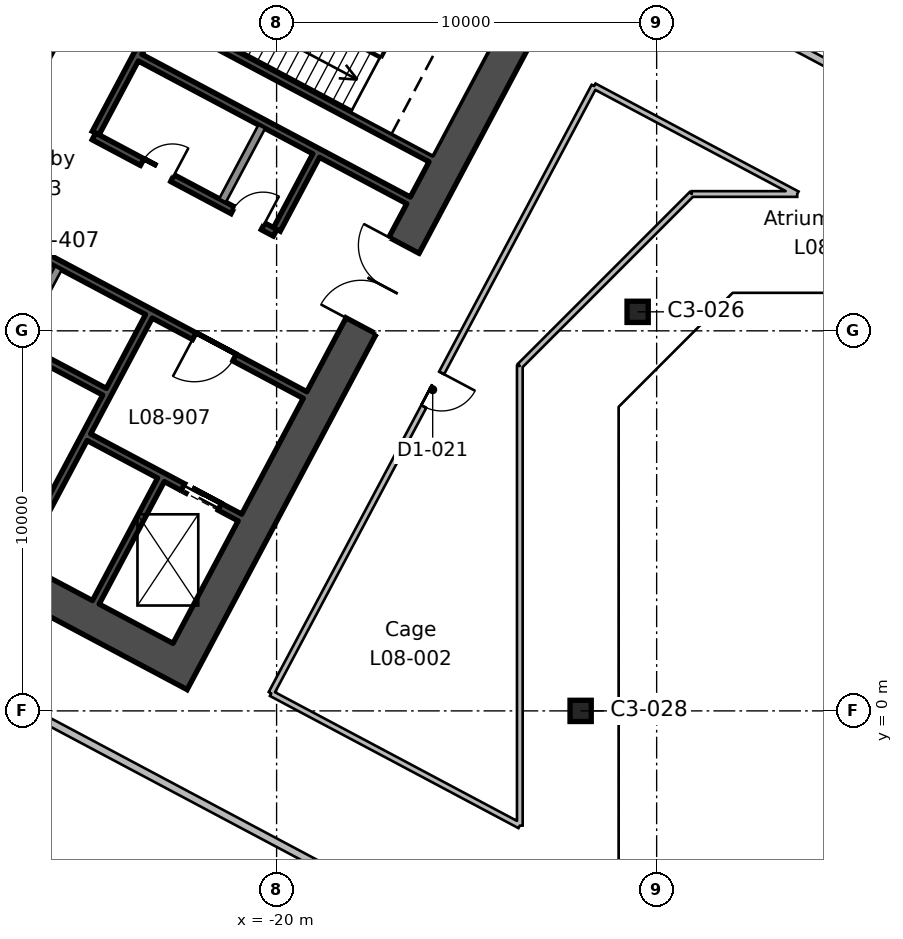
"""IFC4 building model, lengths in metres.
Left out: names, types, materials, properties, quantities, classifications, styles, units other than length and angle.
Written with IfcOpenShell. Run it as: python <this file> out.ifc"""

import sys

from ifc_helpers import new_model, si_unit, direction, frame, frame_2d, origin, origin_2d, place, context, subcontext, project, spatial, rectangle, hollow_rectangle, extrude, element, fill, save


model = new_model("IFC4")
c1 = context("Model", 3, precision=1e-05, world=origin(), true_north=direction((0.0, 1.0)))
c2 = subcontext(c1, "Body", "Model", "MODEL_VIEW")
j1 = project(units=[si_unit("LENGTHUNIT", "METRE"), si_unit("PLANEANGLEUNIT", "RADIAN")], contexts=[c1])
p1 = place(None, origin())
s1 = spatial("IfcSite", under=j1, at=p1, CompositionType="ELEMENT")
p2 = place(p1, origin())
s2 = spatial("IfcBuilding", under=s1, at=p2, CompositionType="ELEMENT")
p3 = place(p2, frame((0.0, 0.0, 44.6)))
s3 = spatial("IfcBuildingStorey", under=s2, at=p3, CompositionType="ELEMENT", Elevation=44.6)
for number, where, z_axis, x_axis in (
    (1, (-12.0, 0.0, 0.0), (0.0, 0.0, 1.0), (1.0, 0.0, 0.0)),
    (2, (-10.5, 10.5, 0.0), (0.0, 0.0, 1.0), (1.0, 0.0, 0.0)),
):
    element("IfcColumn", number, at=place(p3, frame(where, z_axis=z_axis, x_axis=x_axis)), inside=s3, PredefinedType="COLUMN", context=c2, shape_type="SweptSolid", body=[
        extrude(hollow_rectangle(XDim=0.559, YDim=0.559, WallThickness=0.024, InnerFilletRadius=0.012, OuterFilletRadius=0.035, at=origin_2d()), origin(), (0.0, 0.0, 1.0), 5.4),
    ])
p4 = place(p3, frame((-13.362, 18.43, 0.0), z_axis=(0.0, 0.0, 1.0), x_axis=(-0.46947084998, -0.882947971864, 0.0)))
e3 = element("IfcWall", 3, at=p4, inside=s3, PredefinedType="SHEAR", context=c2, shape_type="SweptSolid", body=[
    extrude(rectangle(XDim=20.0, YDim=0.9, at=frame_2d((10.0, 0.0))), origin(), (0.0, 0.0, 1.0), 5.4),
])
p5 = place(p4, frame((7.0, 0.0, 0.0)))
e4 = element("IfcOpeningElement", 4, at=p5, cuts=e3, PredefinedType="OPENING", context=c2, shape_type="SweptSolid", body=[
    extrude(rectangle(XDim=2.4, YDim=2.4, at=frame_2d((1.2, 1.2))), frame((0.0, 0.46, 0.0), z_axis=(0.0, -1.0, 0.0), x_axis=(1.0, 0.0, 0.0)), (0.0, 0.0, 1.0), 0.92),
])
p6 = place(p3, frame((-22.937, 1.38, 0.0), z_axis=(0.0, 0.0, 1.0), x_axis=(-0.88295276571, 0.46946183394, 0.0)))
e5 = element("IfcWall", 5, at=p6, inside=s3, PredefinedType="SHEAR", context=c2, shape_type="SweptSolid", body=[
    extrude(rectangle(XDim=20.2, YDim=0.9, at=frame_2d((10.1, 0.0))), origin(), (0.0, 0.0, 1.0), 5.4),
])
p7 = place(p3, frame((-23.043, 6.08, 0.0), z_axis=(0.0, 0.0, 1.0), x_axis=(-0.469494272526, -0.882935517501, 0.0)))
e6 = element("IfcWall", 6, at=p7, inside=s3, PredefinedType="SHEAR", context=c2, shape_type="SweptSolid", body=[
    extrude(rectangle(XDim=3.65, YDim=0.2, at=frame_2d((1.825, 0.0))), origin(), (0.0, 0.0, 1.0), 5.4),
])
p8 = place(p3, frame((-18.96, 14.611, 0.0), z_axis=(0.0, 0.0, 1.0), x_axis=(-0.4694473164, -0.882960484464, 0.0)))
e7 = element("IfcWall", 7, at=p8, inside=s3, PredefinedType="SHEAR", context=c2, shape_type="SweptSolid", body=[
    extrude(rectangle(XDim=2.2, YDim=0.2, at=frame_2d((1.1, 0.0))), origin(), (0.0, 0.0, 1.0), 5.4),
])
p9 = place(p3, frame((-20.39, 15.372, 0.0), z_axis=(0.0, 0.0, 1.0), x_axis=(-0.4694473164, -0.882960484464, 0.0)))
e8 = element("IfcWall", 8, at=p9, inside=s3, PredefinedType="SOLIDWALL", context=c2, shape_type="SweptSolid", body=[
    extrude(rectangle(XDim=2.2, YDim=0.2, at=frame_2d((1.1, 0.0))), origin(), (0.0, 0.0, 1.0), 5.4),
])
p10 = place(p3, frame((-23.36, 10.382, 0.0), z_axis=(0.0, 0.0, 1.0), x_axis=(-0.469480409012, -0.88294288918, 0.0)))
e9 = element("IfcWall", 9, at=p10, inside=s3, PredefinedType="SHEAR", context=c2, shape_type="SweptSolid", body=[
    extrude(rectangle(XDim=7.3, YDim=0.2, at=frame_2d((3.65, 0.0))), origin(), (0.0, 0.0, 1.0), 5.4),
])
p11 = place(p3, frame((-25.744, 11.65, 0.0), z_axis=(0.0, 0.0, 1.0), x_axis=(-0.469487830541, -0.882938942948, 0.0)))
e10 = element("IfcWall", 10, at=p11, inside=s3, PredefinedType="SOLIDWALL", context=c2, shape_type="SweptSolid", body=[
    extrude(rectangle(XDim=2.2, YDim=0.2, at=frame_2d((1.1, 0.0))), origin(), (0.0, 0.0, 1.0), 5.4),
])
p12 = place(p3, frame((-21.333, 21.649, 0.0), z_axis=(0.0, 0.0, 1.0), x_axis=(-0.469494272526, -0.882935517501, 0.0)))
e11 = element("IfcWall", 11, at=p12, inside=s3, PredefinedType="SHEAR", context=c2, shape_type="SweptSolid", body=[
    extrude(rectangle(XDim=7.3, YDim=0.2, at=frame_2d((3.65, 0.0))), origin(), (0.0, 0.0, 1.0), 5.4),
])
p13 = place(p12, frame((1.3, 0.0, 0.0)))
e12 = element("IfcOpeningElement", 12, at=p13, cuts=e11, PredefinedType="OPENING", context=c2, shape_type="SweptSolid", body=[
    extrude(rectangle(XDim=1.2, YDim=2.1, at=frame_2d((0.6, 1.05))), frame((0.0, 0.11, 0.0), z_axis=(0.0, -1.0, 0.0), x_axis=(1.0, 0.0, 0.0)), (0.0, 0.0, 1.0), 0.22),
])
p14 = place(p3, frame((-23.188, 22.635, 0.0), z_axis=(0.0, 0.0, 1.0), x_axis=(-0.469454336211, -0.882956752176, 0.0)))
e13 = element("IfcWall", 13, at=p14, inside=s3, PredefinedType="SHEAR", context=c2, shape_type="SweptSolid", body=[
    extrude(rectangle(XDim=7.3, YDim=0.2, at=frame_2d((3.65, 0.0))), origin(), (0.0, 0.0, 1.0), 5.4),
])
p15 = place(p14, frame((0.55, 0.0, 0.0)))
e14 = element("IfcOpeningElement", 14, at=p15, cuts=e13, PredefinedType="OPENING", context=c2, shape_type="SweptSolid", body=[
    extrude(rectangle(XDim=0.9, YDim=2.1, at=frame_2d((0.45, 1.05))), frame((0.0, 0.11, 0.0), z_axis=(0.0, -1.0, 0.0), x_axis=(1.0, 0.0, 0.0)), (0.0, 0.0, 1.0), 0.22),
])
p16 = place(p14, frame((2.3, 0.0, 0.0)))
e15 = element("IfcOpeningElement", 15, at=p16, cuts=e13, PredefinedType="OPENING", context=c2, shape_type="SweptSolid", body=[
    extrude(rectangle(XDim=0.9, YDim=2.1, at=frame_2d((0.45, 1.05))), frame((0.0, 0.11, 0.0), z_axis=(0.0, -1.0, 0.0), x_axis=(1.0, 0.0, 0.0)), (0.0, 0.0, 1.0), 0.22),
])
p17 = place(p14, frame((3.8, 0.0, 0.0)))
e16 = element("IfcOpeningElement", 16, at=p17, cuts=e13, PredefinedType="OPENING", context=c2, shape_type="SweptSolid", body=[
    extrude(rectangle(XDim=0.9, YDim=2.1, at=frame_2d((0.45, 1.05))), frame((0.0, 0.11, 0.0), z_axis=(0.0, -1.0, 0.0), x_axis=(1.0, 0.0, 0.0)), (0.0, 0.0, 1.0), 0.22),
])
p18 = place(p3, frame((-15.942, 14.536, 0.0), z_axis=(0.0, 0.0, 1.0), x_axis=(-0.882946947542, 0.469472776449, 0.0)))
e17 = element("IfcWall", 17, at=p18, inside=s3, PredefinedType="SHEAR", context=c2, shape_type="SweptSolid", body=[
    extrude(rectangle(XDim=8.0, YDim=0.2, at=frame_2d((4.0, 0.0))), origin(), (0.0, 0.0, 1.0), 5.4),
])
p19 = place(p3, frame((-16.529, 13.432, 0.0), z_axis=(0.0, 0.0, 1.0), x_axis=(-0.88295287151, 0.469461634952, 0.0)))
e18 = element("IfcWall", 18, at=p19, inside=s3, PredefinedType="SHEAR", context=c2, shape_type="SweptSolid", body=[
    extrude(rectangle(XDim=8.0, YDim=0.2, at=frame_2d((4.0, 0.0))), origin(), (0.0, 0.0, 1.0), 5.4),
])
p20 = place(p3, frame((-20.04, 12.581, 0.0), z_axis=(0.0, 0.0, 1.0), x_axis=(-0.882942972946, 0.469480251476, 0.0)))
e19 = element("IfcWall", 19, at=p20, inside=s3, PredefinedType="SHEAR", context=c2, shape_type="SweptSolid", body=[
    extrude(rectangle(XDim=5.4, YDim=0.2, at=frame_2d((2.7, 0.0))), origin(), (0.0, 0.0, 1.0), 5.4),
])
p21 = place(p20, frame((0.36, 0.0, 0.0)))
e20 = element("IfcOpeningElement", 20, at=p21, cuts=e19, PredefinedType="OPENING", context=c2, shape_type="SweptSolid", body=[
    extrude(rectangle(XDim=0.9, YDim=2.1, at=frame_2d((0.45, 1.05))), frame((0.0, 0.11, 0.0), z_axis=(0.0, -1.0, 0.0), x_axis=(1.0, 0.0, 0.0)), (0.0, 0.0, 1.0), 0.22),
])
p22 = place(p20, frame((3.06, 0.0, 0.0)))
e21 = element("IfcOpeningElement", 21, at=p22, cuts=e19, PredefinedType="OPENING", context=c2, shape_type="SweptSolid", body=[
    extrude(rectangle(XDim=0.9, YDim=2.1, at=frame_2d((0.45, 1.05))), frame((0.0, 0.11, 0.0), z_axis=(0.0, -1.0, 0.0), x_axis=(1.0, 0.0, 0.0)), (0.0, 0.0, 1.0), 0.22),
])
p23 = place(p3, frame((-19.252, 8.311, 0.0), z_axis=(0.0, 0.0, 1.0), x_axis=(-0.882955722218, 0.469456273365, 0.0)))
e22 = element("IfcWall", 22, at=p23, inside=s3, PredefinedType="SHEAR", context=c2, shape_type="SweptSolid", body=[
    extrude(rectangle(XDim=10.0, YDim=0.2, at=frame_2d((5.0, 0.0))), origin(), (0.0, 0.0, 1.0), 5.4),
])
p24 = place(p23, frame((2.1, 0.0, 0.0)))
e23 = element("IfcOpeningElement", 23, at=p24, cuts=e22, PredefinedType="OPENING", context=c2, shape_type="SweptSolid", body=[
    extrude(rectangle(XDim=1.2, YDim=2.1, at=frame_2d((0.6, 1.05))), frame((0.0, 0.11, 0.0), z_axis=(0.0, -1.0, 0.0), x_axis=(1.0, 0.0, 0.0)), (0.0, 0.0, 1.0), 0.22),
])
p25 = place(p3, frame((-24.528, 8.398, 0.0), z_axis=(0.0, 0.0, 1.0), x_axis=(-0.882953967957, 0.469459572775, 0.0)))
e24 = element("IfcWall", 24, at=p25, inside=s3, PredefinedType="SHEAR", context=c2, shape_type="SweptSolid", body=[
    extrude(rectangle(XDim=5.2, YDim=0.2, at=frame_2d((2.6, 0.0))), origin(), (0.0, 0.0, 1.0), 5.4),
])
p26 = place(p3, frame((-20.965, 5.088, 0.0), z_axis=(0.0, 0.0, 1.0), x_axis=(-0.882925986334, 0.469512196493, 0.0)))
e25 = element("IfcWall", 25, at=p26, inside=s3, PredefinedType="SHEAR", context=c2, shape_type="SweptSolid", body=[
    extrude(rectangle(XDim=4.5, YDim=0.2, at=frame_2d((2.25, 0.0))), origin(), (0.0, 0.0, 1.0), 5.4),
])
p27 = place(p26, frame((0.6, 0.0, 0.0)))
e26 = element("IfcOpeningElement", 26, at=p27, cuts=e25, PredefinedType="OPENING", context=c2, shape_type="SweptSolid", body=[
    extrude(rectangle(XDim=1.1, YDim=2.1, at=frame_2d((0.55, 1.05))), frame((0.0, 0.11, 0.0), z_axis=(0.0, -1.0, 0.0), x_axis=(1.0, 0.0, 0.0)), (0.0, 0.0, 1.0), 0.22),
])
p28 = place(p3, frame((-13.6, -6.869, 0.0), z_axis=(0.0, 0.0, 1.0), x_axis=(-0.88295406426, 0.469459391648, 0.0)))
e27 = element("IfcWall", 27, at=p28, inside=s3, PredefinedType="PARTITIONING", context=c2, shape_type="SweptSolid", body=[
    extrude(rectangle(XDim=35.091, YDim=0.2, at=frame_2d((17.545, 0.0))), origin(), (0.0, 0.0, 1.0), 4.95),
])
p29 = place(p28, frame((20.45, 0.0, 0.0)))
e28 = element("IfcOpeningElement", 28, at=p29, cuts=e27, PredefinedType="OPENING", context=c2, shape_type="SweptSolid", body=[
    extrude(rectangle(XDim=1.0, YDim=2.1, at=frame_2d((0.5, 1.05))), frame((0.0, 0.11, 0.0), z_axis=(0.0, -1.0, 0.0), x_axis=(1.0, 0.0, 0.0)), (0.0, 0.0, 1.0), 0.22),
])
p30 = place(p28, frame((17.05, 0.0, 0.0)))
e29 = element("IfcOpeningElement", 29, at=p30, cuts=e27, PredefinedType="OPENING", context=c2, shape_type="SweptSolid", body=[
    extrude(rectangle(XDim=1.0, YDim=2.1, at=frame_2d((0.5, 1.05))), frame((0.0, 0.11, 0.0), z_axis=(0.0, -1.0, 0.0), x_axis=(1.0, 0.0, 0.0)), (0.0, 0.0, 1.0), 0.22),
])
p31 = place(p3, frame((-32.894, 31.59, 0.0), z_axis=(0.0, 0.0, 1.0), x_axis=(0.882948512555, -0.469469833085, 0.0)))
e30 = element("IfcWall", 30, at=p31, inside=s3, PredefinedType="PARTITIONING", context=c2, shape_type="SweptSolid", body=[
    extrude(rectangle(XDim=37.255, YDim=0.2, at=frame_2d((18.627, 0.0))), origin(), (0.0, 0.0, 1.0), 4.95),
])
p32 = place(p31, frame((18.15, 0.0, 0.0)))
e31 = element("IfcOpeningElement", 31, at=p32, cuts=e30, PredefinedType="OPENING", context=c2, shape_type="SweptSolid", body=[
    extrude(rectangle(XDim=1.0, YDim=2.1, at=frame_2d((0.5, 1.05))), frame((0.0, 0.11, 0.0), z_axis=(0.0, -1.0, 0.0), x_axis=(1.0, 0.0, 0.0)), (0.0, 0.0, 1.0), 0.22),
])
p33 = place(p31, frame((14.65, 0.0, 0.0)))
e32 = element("IfcOpeningElement", 32, at=p33, cuts=e30, PredefinedType="OPENING", context=c2, shape_type="SweptSolid", body=[
    extrude(rectangle(XDim=1.0, YDim=2.1, at=frame_2d((0.5, 1.05))), frame((0.0, 0.11, 0.0), z_axis=(0.0, -1.0, 0.0), x_axis=(1.0, 0.0, 0.0)), (0.0, 0.0, 1.0), 0.22),
])
p34 = place(p3, frame((-20.142, 0.46, 0.0), z_axis=(0.0, 0.0, 1.0), x_axis=(0.469506937019, 0.882928783136, 0.0)))
e33 = element("IfcWall", 33, at=p34, inside=s3, PredefinedType="PARTITIONING", context=c2, shape_type="SweptSolid", body=[
    extrude(rectangle(XDim=18.1, YDim=0.15, at=frame_2d((9.05, 0.0))), origin(), (0.0, 0.0, 1.0), 4.95),
])
p35 = place(p34, frame((8.55, 0.0, 0.0)))
e34 = element("IfcOpeningElement", 34, at=p35, cuts=e33, PredefinedType="OPENING", context=c2, shape_type="SweptSolid", body=[
    extrude(rectangle(XDim=1.0, YDim=2.1, at=frame_2d((0.5, 1.05))), frame((0.0, 0.085, 0.0), z_axis=(0.0, -1.0, 0.0), x_axis=(1.0, 0.0, 0.0)), (0.0, 0.0, 1.0), 0.17),
])
p36 = place(p3, frame((-11.644, 16.441, 0.0), z_axis=(0.0, 0.0, 1.0), x_axis=(0.882853947977, -0.469647640834, 0.0)))
e35 = element("IfcWall", 35, at=p36, inside=s3, PredefinedType="PARTITIONING", context=c2, shape_type="SweptSolid", body=[
    extrude(rectangle(XDim=3.153, YDim=0.15, at=frame_2d((1.577, 0.0))), origin(), (0.0, 0.0, 1.0), 4.95),
])
p37 = place(p3, frame((-13.6, -3.019, 0.0), z_axis=(0.0, 0.0, 1.0), x_axis=(-0.882915984826, 0.469531004022, 0.0)))
e36 = element("IfcWall", 36, at=p37, inside=s3, PredefinedType="PARTITIONING", context=c2, shape_type="SweptSolid", body=[
    extrude(rectangle(XDim=7.409, YDim=0.15, at=frame_2d((3.705, 0.0))), origin(), (0.0, 0.0, 1.0), 4.95),
])
p38 = place(p3, frame((-13.6, 9.077, 0.0), z_axis=(0.0, 0.0, 1.0), x_axis=(0.0, -1.0, 0.0)))
e37 = element("IfcWall", 37, at=p38, inside=s3, PredefinedType="PARTITIONING", context=c2, shape_type="SweptSolid", body=[
    extrude(rectangle(XDim=12.096, YDim=0.15, at=frame_2d((6.048, 0.0))), origin(), (0.0, 0.0, 1.0), 4.95),
])
p39 = place(p3, frame((-13.6, 9.077, 0.0), z_axis=(0.0, 0.0, 1.0), x_axis=(0.707106781187, 0.707106781187, 0.0)))
e38 = element("IfcWall", 38, at=p39, inside=s3, PredefinedType="PARTITIONING", context=c2, shape_type="SweptSolid", body=[
    extrude(rectangle(XDim=6.397, YDim=0.15, at=frame_2d((3.198, 0.0))), origin(), (0.0, 0.0, 1.0), 4.95),
])
p40 = place(p3, frame((-6.301, 13.6, 0.0), z_axis=(0.0, 0.0, 1.0), x_axis=(-1.0, 0.0, 0.0)))
e39 = element("IfcWall", 39, at=p40, inside=s3, PredefinedType="PARTITIONING", context=c2, shape_type="SweptSolid", body=[
    extrude(rectangle(XDim=2.776, YDim=0.15, at=frame_2d((1.388, 0.0))), origin(), (0.0, 0.0, 1.0), 4.95),
])
p41 = place(p3, frame((-6.301, 13.6, 0.0), z_axis=(0.0, 0.0, 1.0), x_axis=(-0.883065539011, 0.469249671083, 0.0)))
e40 = element("IfcWall", 40, at=p41, inside=s3, PredefinedType="PARTITIONING", context=c2, shape_type="SweptSolid", body=[
    extrude(rectangle(XDim=2.898, YDim=0.15, at=frame_2d((1.449, 0.0))), origin(), (0.0, 0.0, 1.0), 4.95),
])
p42 = place(p5, frame((2.4, 0.0, 0.0), z_axis=(0.0, 0.0, 1.0), x_axis=(-1.0, 0.0, 0.0)))
e41 = element("IfcDoor", 41, at=p42, inside=s3, OperationType="DOUBLE_DOOR_SINGLE_SWING", PredefinedType="DOOR", context=c2, shape_type="SweptSolid", body=[
    extrude(rectangle(XDim=2.4, YDim=2.4, at=frame_2d((1.2, 1.2))), frame((0.0, 0.025, 0.0), z_axis=(0.0, -1.0, 0.0), x_axis=(1.0, 0.0, 0.0)), (0.0, 0.0, 1.0), 0.05),
])
fill(e4, e41)
p43 = place(p24, origin())
e42 = element("IfcDoor", 42, at=p43, inside=s3, OperationType="SINGLE_SWING_RIGHT", PredefinedType="DOOR", context=c2, shape_type="SweptSolid", body=[
    extrude(rectangle(XDim=1.2, YDim=2.1, at=frame_2d((0.6, 1.05))), frame((0.0, 0.025, 0.0), z_axis=(0.0, -1.0, 0.0), x_axis=(1.0, 0.0, 0.0)), (0.0, 0.0, 1.0), 0.05),
])
fill(e23, e42)
p44 = place(p21, frame((0.9, 0.0, 0.0), z_axis=(0.0, 0.0, 1.0), x_axis=(-1.0, 0.0, 0.0)))
e43 = element("IfcDoor", 43, at=p44, inside=s3, OperationType="SINGLE_SWING_RIGHT", PredefinedType="DOOR", context=c2, shape_type="SweptSolid", body=[
    extrude(rectangle(XDim=0.9, YDim=2.1, at=frame_2d((0.45, 1.05))), frame((0.0, 0.025, 0.0), z_axis=(0.0, -1.0, 0.0), x_axis=(1.0, 0.0, 0.0)), (0.0, 0.0, 1.0), 0.05),
])
fill(e20, e43)
p45 = place(p22, frame((0.9, 0.0, 0.0), z_axis=(0.0, 0.0, 1.0), x_axis=(-1.0, 0.0, 0.0)))
e44 = element("IfcDoor", 44, at=p45, inside=s3, OperationType="SINGLE_SWING_RIGHT", PredefinedType="DOOR", context=c2, shape_type="SweptSolid", body=[
    extrude(rectangle(XDim=0.9, YDim=2.1, at=frame_2d((0.45, 1.05))), frame((0.0, 0.025, 0.0), z_axis=(0.0, -1.0, 0.0), x_axis=(1.0, 0.0, 0.0)), (0.0, 0.0, 1.0), 0.05),
])
fill(e21, e44)
p46 = place(p27, origin())
e45 = element("IfcDoor", 45, at=p46, inside=s3, OperationType="DOUBLE_DOOR_SLIDING", PredefinedType="DOOR", context=c2, shape_type="SweptSolid", body=[
    extrude(rectangle(XDim=1.1, YDim=2.1, at=frame_2d((0.55, 1.05))), frame((0.0, 0.025, 0.0), z_axis=(0.0, -1.0, 0.0), x_axis=(1.0, 0.0, 0.0)), (0.0, 0.0, 1.0), 0.05),
])
fill(e26, e45)
p47 = place(p35, frame((1.0, 0.0, 0.0), z_axis=(0.0, 0.0, 1.0), x_axis=(-1.0, 0.0, 0.0)))
e46 = element("IfcDoor", 46, at=p47, inside=s3, OperationType="SINGLE_SWING_LEFT", PredefinedType="DOOR", context=c2, shape_type="SweptSolid", body=[
    extrude(rectangle(XDim=1.0, YDim=2.1, at=frame_2d((0.5, 1.05))), frame((0.0, 0.025, 0.0), z_axis=(0.0, -1.0, 0.0), x_axis=(1.0, 0.0, 0.0)), (0.0, 0.0, 1.0), 0.05),
])
fill(e34, e46)
save(model, sys.argv[1])
